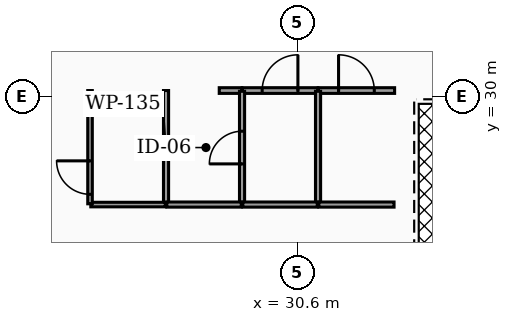
"""IFC4 building model, lengths in metres.
Left out: names, types, materials, properties, quantities, classifications, styles, units other than length and angle.
Written with IfcOpenShell. Run it as: python <this file> out.ifc"""

import sys

from ifc_helpers import new_model, si_unit, direction, frame, frame_2d, origin, place, context, subcontext, project, spatial, rectangle, extrude, element, fill, save


model = new_model("IFC4")
c1 = context("Model", 3, precision=1e-05, world=origin(), true_north=direction((0.0, 1.0)))
c2 = subcontext(c1, "Body", "Model", "MODEL_VIEW")
j1 = project(units=[si_unit("LENGTHUNIT", "METRE"), si_unit("PLANEANGLEUNIT", "RADIAN")], contexts=[c1])
p1 = place(None, origin())
s1 = spatial("IfcSite", under=j1, at=p1, CompositionType="ELEMENT")
p2 = place(p1, origin())
s2 = spatial("IfcBuilding", under=s1, at=p2, CompositionType="ELEMENT")
p3 = place(p2, frame((0.0, 0.0, 134.64)))
s3 = spatial("IfcBuildingStorey", under=s2, at=p3, CompositionType="ELEMENT", Elevation=134.64)
p4 = place(p3, frame((28.55, 30.15, 0.0), z_axis=(0.0, 0.0, 1.0), x_axis=(1.0, 0.0, 0.0)))
e1 = element("IfcWall", 1, at=p4, inside=s3, PredefinedType="PARTITIONING", context=c2, shape_type="SweptSolid", body=[
    extrude(rectangle(XDim=0.595, YDim=0.15, at=frame_2d((0.297, 0.0))), origin(), (0.0, 0.0, 1.0), 2.457),
])
p5 = place(p3, frame((29.155, 30.15, 0.0), z_axis=(0.0, 0.0, 1.0), x_axis=(1.0, 0.0, 0.0)))
e2 = element("IfcWall", 2, at=p5, inside=s3, PredefinedType="PARTITIONING", context=c2, shape_type="SweptSolid", body=[
    extrude(rectangle(XDim=1.99, YDim=0.15, at=frame_2d((0.995, 0.0))), origin(), (0.0, 0.0, 1.0), 2.457),
])
p6 = place(p5, frame((0.525, 0.0, 0.0)))
e3 = element("IfcOpeningElement", 3, at=p6, cuts=e2, PredefinedType="OPENING", context=c2, shape_type="SweptSolid", body=[
    extrude(rectangle(XDim=0.94, YDim=2.05, at=frame_2d((0.47, 1.025))), frame((0.0, 0.085, 0.0), z_axis=(0.0, -1.0, 0.0), x_axis=(1.0, 0.0, 0.0)), (0.0, 0.0, 1.0), 0.17),
])
p7 = place(p3, frame((31.155, 30.15, 0.0), z_axis=(0.0, 0.0, 1.0), x_axis=(1.0, 0.0, 0.0)))
e4 = element("IfcWall", 4, at=p7, inside=s3, PredefinedType="PARTITIONING", context=c2, shape_type="SweptSolid", body=[
    extrude(rectangle(XDim=2.01, YDim=0.15, at=frame_2d((1.005, 0.0))), origin(), (0.0, 0.0, 1.0), 2.457),
])
p8 = place(p7, frame((0.535, 0.0, 0.0)))
e5 = element("IfcOpeningElement", 5, at=p8, cuts=e4, PredefinedType="OPENING", context=c2, shape_type="SweptSolid", body=[
    extrude(rectangle(XDim=0.94, YDim=2.05, at=frame_2d((0.47, 1.025))), frame((0.0, 0.085, 0.0), z_axis=(0.0, -1.0, 0.0), x_axis=(1.0, 0.0, 0.0)), (0.0, 0.0, 1.0), 0.17),
])
p9 = place(p3, frame((27.15, 27.17, 0.0), z_axis=(0.0, 0.0, 1.0), x_axis=(0.0, 1.0, 0.0)))
e6 = element("IfcWall", 6, at=p9, inside=s3, PredefinedType="PARTITIONING", context=c2, shape_type="SweptSolid", body=[
    extrude(rectangle(XDim=2.98, YDim=0.135, at=frame_2d((1.49, 0.0))), origin(), (0.0, 0.0, 1.0), 2.457),
])
p10 = place(p3, frame((25.17, 27.15, 0.0), z_axis=(0.0, 0.0, 1.0), x_axis=(1.0, 0.0, 0.0)))
e7 = element("IfcWall", 7, at=p10, inside=s3, PredefinedType="PARTITIONING", context=c2, shape_type="SweptSolid", body=[
    extrude(rectangle(XDim=1.96, YDim=0.12, at=frame_2d((0.98, 0.0))), origin(), (0.0, 0.0, 1.0), 2.457),
])
p11 = place(p3, frame((25.15, 27.17, 0.0), z_axis=(0.0, 0.0, 1.0), x_axis=(0.0, 1.0, 0.0)))
e8 = element("IfcWall", 8, at=p11, inside=s3, PredefinedType="PARTITIONING", context=c2, shape_type="SweptSolid", body=[
    extrude(rectangle(XDim=2.98, YDim=0.12, at=frame_2d((1.49, 0.0))), origin(), (0.0, 0.0, 1.0), 2.457),
])
p12 = place(p11, frame((0.25, 0.0, 0.0)))
e9 = element("IfcOpeningElement", 9, at=p12, cuts=e8, PredefinedType="OPENING", context=c2, shape_type="SweptSolid", body=[
    extrude(rectangle(XDim=0.88, YDim=2.05, at=frame_2d((0.44, 1.025))), frame((0.0, 0.07, 0.0), z_axis=(0.0, -1.0, 0.0), x_axis=(1.0, 0.0, 0.0)), (0.0, 0.0, 1.0), 0.14),
])
p13 = place(p3, frame((29.15, 27.17, 0.0), z_axis=(0.0, 0.0, 1.0), x_axis=(0.0, 1.0, 0.0)))
e10 = element("IfcWall", 10, at=p13, inside=s3, PredefinedType="PARTITIONING", context=c2, shape_type="SweptSolid", body=[
    extrude(rectangle(XDim=2.96, YDim=0.135, at=frame_2d((1.48, 0.0))), origin(), (0.0, 0.0, 1.0), 2.457),
])
p14 = place(p13, frame((1.05, 0.0, 0.0)))
e11 = element("IfcOpeningElement", 11, at=p14, cuts=e10, PredefinedType="OPENING", context=c2, shape_type="SweptSolid", body=[
    extrude(rectangle(XDim=0.86, YDim=2.05, at=frame_2d((0.43, 1.025))), frame((0.0, 0.077, 0.0), z_axis=(0.0, -1.0, 0.0), x_axis=(1.0, 0.0, 0.0)), (0.0, 0.0, 1.0), 0.155),
])
p15 = place(p3, frame((27.17, 27.15, 0.0), z_axis=(0.0, 0.0, 1.0), x_axis=(1.0, 0.0, 0.0)))
e12 = element("IfcWall", 12, at=p15, inside=s3, PredefinedType="PARTITIONING", context=c2, shape_type="SweptSolid", body=[
    extrude(rectangle(XDim=1.96, YDim=0.135, at=frame_2d((0.98, 0.0))), origin(), (0.0, 0.0, 1.0), 2.457),
])
p16 = place(p3, frame((31.15, 27.17, 0.0), z_axis=(0.0, 0.0, 1.0), x_axis=(0.0, 1.0, 0.0)))
e13 = element("IfcWall", 13, at=p16, inside=s3, PredefinedType="PARTITIONING", context=c2, shape_type="SweptSolid", body=[
    extrude(rectangle(XDim=2.96, YDim=0.135, at=frame_2d((1.48, 0.0))), origin(), (0.0, 0.0, 1.0), 2.457),
])
p17 = place(p3, frame((29.17, 27.15, 0.0), z_axis=(0.0, 0.0, 1.0), x_axis=(1.0, 0.0, 0.0)))
e14 = element("IfcWall", 14, at=p17, inside=s3, PredefinedType="PARTITIONING", context=c2, shape_type="SweptSolid", body=[
    extrude(rectangle(XDim=1.96, YDim=0.135, at=frame_2d((0.98, 0.0))), origin(), (0.0, 0.0, 1.0), 2.457),
])
p18 = place(p3, frame((31.17, 27.15, 0.0), z_axis=(0.0, 0.0, 1.0), x_axis=(1.0, 0.0, 0.0)))
e15 = element("IfcWall", 15, at=p18, inside=s3, PredefinedType="PARTITIONING", context=c2, shape_type="SweptSolid", body=[
    extrude(rectangle(XDim=1.98, YDim=0.135, at=frame_2d((0.99, 0.0))), origin(), (0.0, 0.0, 1.0), 2.457),
])
p19 = place(p6, origin())
e16 = element("IfcDoor", 16, at=p19, inside=s3, OperationType="SINGLE_SWING_RIGHT", PredefinedType="DOOR", context=c2, shape_type="SweptSolid", body=[
    extrude(rectangle(XDim=0.94, YDim=2.05, at=frame_2d((0.47, 1.025))), frame((0.0, 0.025, 0.0), z_axis=(0.0, -1.0, 0.0), x_axis=(1.0, 0.0, 0.0)), (0.0, 0.0, 1.0), 0.05),
])
fill(e3, e16)
p20 = place(p8, origin())
e17 = element("IfcDoor", 17, at=p20, inside=s3, OperationType="SINGLE_SWING_LEFT", PredefinedType="DOOR", context=c2, shape_type="SweptSolid", body=[
    extrude(rectangle(XDim=0.94, YDim=2.05, at=frame_2d((0.47, 1.025))), frame((0.0, 0.025, 0.0), z_axis=(0.0, -1.0, 0.0), x_axis=(1.0, 0.0, 0.0)), (0.0, 0.0, 1.0), 0.05),
])
fill(e5, e17)
p21 = place(p12, origin())
e18 = element("IfcDoor", 18, at=p21, inside=s3, OperationType="SINGLE_SWING_RIGHT", PredefinedType="DOOR", context=c2, shape_type="SweptSolid", body=[
    extrude(rectangle(XDim=0.88, YDim=2.05, at=frame_2d((0.44, 1.025))), frame((0.0, 0.025, 0.0), z_axis=(0.0, -1.0, 0.0), x_axis=(1.0, 0.0, 0.0)), (0.0, 0.0, 1.0), 0.05),
])
fill(e9, e18)
p22 = place(p14, origin())
e19 = element("IfcDoor", 19, at=p22, inside=s3, OperationType="SINGLE_SWING_LEFT", PredefinedType="DOOR", context=c2, shape_type="SweptSolid", body=[
    extrude(rectangle(XDim=0.86, YDim=2.05, at=frame_2d((0.43, 1.025))), frame((0.0, 0.025, 0.0), z_axis=(0.0, -1.0, 0.0), x_axis=(1.0, 0.0, 0.0)), (0.0, 0.0, 1.0), 0.05),
])
fill(e11, e19)
save(model, sys.argv[1])
